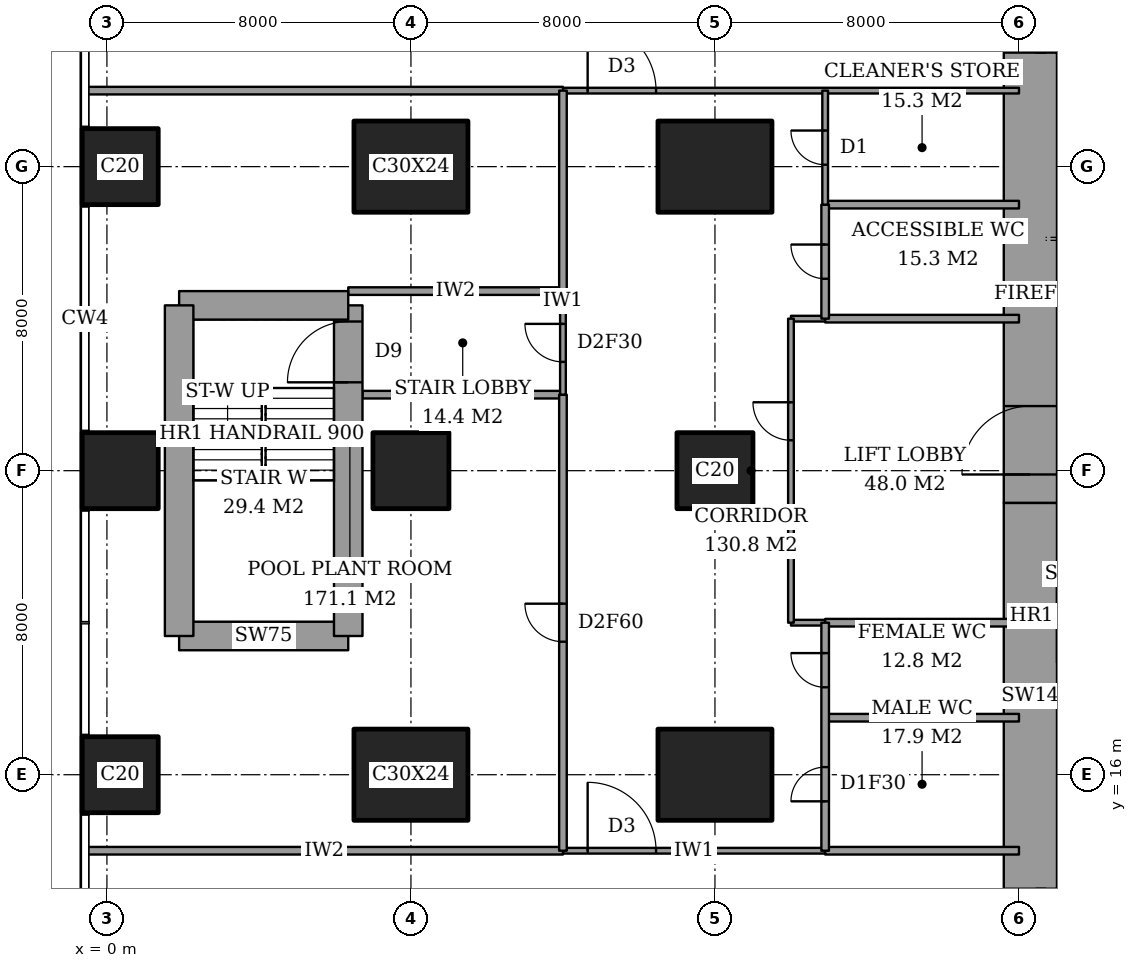
"""IFC4 building model, lengths in metres.
Left out: names, types, materials, properties, quantities, classifications, styles, units other than length and angle.
Written with IfcOpenShell. Run it as: python <this file> out.ifc"""

import sys

from ifc_helpers import new_model, si_unit, direction, frame, frame_2d, origin, origin_2d, place, context, subcontext, project, spatial, rectangle, extrude, element, fill, save


model = new_model("IFC4")
c1 = context("Model", 3, precision=1e-05, world=origin(), true_north=direction((0.0, 1.0)))
c2 = subcontext(c1, "Body", "Model", "MODEL_VIEW")
j1 = project(units=[si_unit("LENGTHUNIT", "METRE"), si_unit("PLANEANGLEUNIT", "RADIAN")], contexts=[c1])
p1 = place(None, origin())
s1 = spatial("IfcSite", under=j1, at=p1, CompositionType="ELEMENT")
p2 = place(p1, origin())
s2 = spatial("IfcBuilding", under=s1, at=p2, CompositionType="ELEMENT")
p3 = place(p2, frame((0.0, 0.0, 26.0)))
s3 = spatial("IfcBuildingStorey", under=s2, at=p3, CompositionType="ELEMENT", Elevation=26.0)
for number, where, z_axis, x_axis in (
    (1, (0.35, 16.0, 0.0), (0.0, 0.0, 1.0), (1.0, 0.0, 0.0)),
    (2, (0.35, 24.0, 0.0), (0.0, 0.0, 1.0), (1.0, 0.0, 0.0)),
    (3, (0.35, 32.0, 0.0), (0.0, 0.0, 1.0), (1.0, 0.0, 0.0)),
):
    element("IfcColumn", number, at=place(p3, frame(where, z_axis=z_axis, x_axis=x_axis)), inside=s3, PredefinedType="COLUMN", context=c2, shape_type="SweptSolid", body=[
        extrude(rectangle(XDim=2.0, YDim=2.0, at=origin_2d()), origin(), (0.0, 0.0, 1.0), 3.6),
    ])
p4 = place(p3, frame((8.0, 16.0, 0.0), z_axis=(0.0, 0.0, 1.0), x_axis=(1.0, 0.0, 0.0)))
e4 = element("IfcColumn", 4, at=p4, inside=s3, PredefinedType="COLUMN", context=c2, shape_type="SweptSolid", body=[
    extrude(rectangle(XDim=3.0, YDim=2.4, at=origin_2d()), origin(), (0.0, 0.0, 1.0), 3.6),
])
p5 = place(p3, frame((8.0, 24.0, 0.0), z_axis=(0.0, 0.0, 1.0), x_axis=(1.0, 0.0, 0.0)))
e5 = element("IfcColumn", 5, at=p5, inside=s3, PredefinedType="COLUMN", context=c2, shape_type="SweptSolid", body=[
    extrude(rectangle(XDim=2.0, YDim=2.0, at=origin_2d()), origin(), (0.0, 0.0, 1.0), 3.6),
])
for number, where, z_axis, x_axis in (
    (6, (8.0, 32.0, 0.0), (0.0, 0.0, 1.0), (1.0, 0.0, 0.0)),
    (7, (16.0, 16.0, 0.0), (0.0, 0.0, 1.0), (1.0, 0.0, 0.0)),
):
    element("IfcColumn", number, at=place(p3, frame(where, z_axis=z_axis, x_axis=x_axis)), inside=s3, PredefinedType="COLUMN", context=c2, shape_type="SweptSolid", body=[
        extrude(rectangle(XDim=3.0, YDim=2.4, at=origin_2d()), origin(), (0.0, 0.0, 1.0), 3.6),
    ])
p6 = place(p3, frame((16.0, 24.0, 0.0), z_axis=(0.0, 0.0, 1.0), x_axis=(1.0, 0.0, 0.0)))
e8 = element("IfcColumn", 8, at=p6, inside=s3, PredefinedType="COLUMN", context=c2, shape_type="SweptSolid", body=[
    extrude(rectangle(XDim=2.0, YDim=2.0, at=origin_2d()), origin(), (0.0, 0.0, 1.0), 3.6),
])
p7 = place(p3, frame((16.0, 32.0, 0.0), z_axis=(0.0, 0.0, 1.0), x_axis=(1.0, 0.0, 0.0)))
e9 = element("IfcColumn", 9, at=p7, inside=s3, PredefinedType="COLUMN", context=c2, shape_type="SweptSolid", body=[
    extrude(rectangle(XDim=3.0, YDim=2.4, at=origin_2d()), origin(), (0.0, 0.0, 1.0), 3.6),
])
p8 = place(p3, frame((24.3, 13.0, 0.0), z_axis=(0.0, 0.0, 1.0), x_axis=(0.0, 1.0, 0.0)))
e10 = element("IfcWall", 10, at=p8, inside=s3, PredefinedType="SHEAR", context=c2, shape_type="SweptSolid", body=[
    extrude(rectangle(XDim=10.15, YDim=1.4, at=frame_2d((5.075, 0.0))), origin(), (0.0, 0.0, 1.0), 3.6),
])
p9 = place(p3, frame((24.3, 23.15, 0.0), z_axis=(0.0, 0.0, 1.0), x_axis=(0.0, 1.0, 0.0)))
e11 = element("IfcWall", 11, at=p9, inside=s3, PredefinedType="SHEAR", context=c2, shape_type="SweptSolid", body=[
    extrude(rectangle(XDim=11.85, YDim=1.4, at=frame_2d((5.925, 0.0))), origin(), (0.0, 0.0, 1.0), 3.6),
])
p10 = place(p9, frame((0.75, 0.0, 0.0)))
e12 = element("IfcOpeningElement", 12, at=p10, cuts=e11, PredefinedType="OPENING", context=c2, shape_type="SweptSolid", body=[
    extrude(rectangle(XDim=1.8, YDim=2.4, at=frame_2d((0.9, 1.2))), frame((0.0, 0.71, 0.0), z_axis=(0.0, -1.0, 0.0), x_axis=(1.0, 0.0, 0.0)), (0.0, 0.0, 1.0), 1.42),
])
p11 = place(p3, frame((1.9, 19.65, 0.0), z_axis=(0.0, 0.0, 1.0), x_axis=(1.0, 0.0, 0.0)))
e13 = element("IfcWall", 13, at=p11, inside=s3, PredefinedType="SHEAR", context=c2, shape_type="SweptSolid", body=[
    extrude(rectangle(XDim=4.45, YDim=0.75, at=frame_2d((2.225, 0.0))), origin(), (0.0, 0.0, 1.0), 3.6),
])
p12 = place(p3, frame((6.35, 19.65, 0.0), z_axis=(0.0, 0.0, 1.0), x_axis=(0.0, 1.0, 0.0)))
e14 = element("IfcWall", 14, at=p12, inside=s3, PredefinedType="SHEAR", context=c2, shape_type="SweptSolid", body=[
    extrude(rectangle(XDim=8.7, YDim=0.75, at=frame_2d((4.35, 0.0))), origin(), (0.0, 0.0, 1.0), 3.6),
])
p13 = place(p12, frame((6.675, 0.0, 0.0)))
e15 = element("IfcOpeningElement", 15, at=p13, cuts=e14, PredefinedType="OPENING", context=c2, shape_type="SweptSolid", body=[
    extrude(rectangle(XDim=1.6, YDim=2.1, at=frame_2d((0.8, 1.05))), frame((0.0, 0.385, 0.0), z_axis=(0.0, -1.0, 0.0), x_axis=(1.0, 0.0, 0.0)), (0.0, 0.0, 1.0), 0.77),
])
p14 = place(p3, frame((6.35, 28.35, 0.0), z_axis=(0.0, 0.0, 1.0), x_axis=(-1.0, 0.0, 0.0)))
e16 = element("IfcWall", 16, at=p14, inside=s3, PredefinedType="SHEAR", context=c2, shape_type="SweptSolid", body=[
    extrude(rectangle(XDim=4.45, YDim=0.75, at=frame_2d((2.225, 0.0))), origin(), (0.0, 0.0, 1.0), 3.6),
])
p15 = place(p3, frame((1.9, 28.35, 0.0), z_axis=(0.0, 0.0, 1.0), x_axis=(0.0, -1.0, 0.0)))
e17 = element("IfcWall", 17, at=p15, inside=s3, PredefinedType="SHEAR", context=c2, shape_type="SweptSolid", body=[
    extrude(rectangle(XDim=8.7, YDim=0.75, at=frame_2d((4.35, 0.0))), origin(), (0.0, 0.0, 1.0), 3.6),
])
p16 = place(p3, frame((24.575, -0.575, 0.0), z_axis=(0.0, 0.0, 1.0), x_axis=(0.0, 1.0, 0.0)))
e18 = element("IfcWall", 18, at=p16, inside=s3, PredefinedType="SOLIDWALL", context=c2, shape_type="SweptSolid", body=[
    extrude(rectangle(XDim=13.575, YDim=0.25, at=frame_2d((6.788, 0.0))), origin(), (0.0, 0.0, 1.0), 3.6),
])
p17 = place(p16, frame((6.15, 0.0, 0.0)))
e19 = element("IfcOpeningElement", 19, at=p17, cuts=e18, PredefinedType="OPENING", context=c2, shape_type="SweptSolid", body=[
    extrude(rectangle(XDim=1.0, YDim=2.4, at=frame_2d((0.5, 1.2))), frame((0.0, 0.135, 0.0), z_axis=(0.0, -1.0, 0.0), x_axis=(1.0, 0.0, 0.0)), (0.0, 0.0, 1.0), 0.27),
])
p18 = place(p16, frame((2.688, 0.0, 0.6)))
e20 = element("IfcOpeningElement", 20, at=p18, cuts=e18, PredefinedType="OPENING", context=c2, shape_type="SweptSolid", body=[
    extrude(rectangle(XDim=2.4, YDim=2.0, at=frame_2d((1.2, 1.0))), frame((0.0, 0.135, 0.0), z_axis=(0.0, -1.0, 0.0), x_axis=(1.0, 0.0, 0.0)), (0.0, 0.0, 1.0), 0.27),
])
p19 = place(p16, frame((10.525, 0.0, 0.6)))
e21 = element("IfcOpeningElement", 21, at=p19, cuts=e18, PredefinedType="OPENING", context=c2, shape_type="SweptSolid", body=[
    extrude(rectangle(XDim=2.4, YDim=2.0, at=frame_2d((1.2, 1.0))), frame((0.0, 0.135, 0.0), z_axis=(0.0, -1.0, 0.0), x_axis=(1.0, 0.0, 0.0)), (0.0, 0.0, 1.0), 0.27),
])
p20 = place(p3, frame((-0.561, 14.0, 0.0), z_axis=(0.0, 0.0, 1.0), x_axis=(1.0, 0.0, 0.0)))
e22 = element("IfcWall", 22, at=p20, inside=s3, PredefinedType="PARTITIONING", context=c2, shape_type="SweptSolid", body=[
    extrude(rectangle(XDim=12.561, YDim=0.2, at=frame_2d((6.281, 0.0))), origin(), (0.0, 0.0, 1.0), 3.35),
])
p21 = place(p3, frame((18.9, 14.0, 0.0), z_axis=(0.0, 0.0, 1.0), x_axis=(1.0, 0.0, 0.0)))
e23 = element("IfcWall", 23, at=p21, inside=s3, PredefinedType="PARTITIONING", context=c2, shape_type="SweptSolid", body=[
    extrude(rectangle(XDim=5.1, YDim=0.2, at=frame_2d((2.55, 0.0))), origin(), (0.0, 0.0, 1.0), 3.35),
])
p22 = place(p3, frame((12.0, 14.0, 0.0), z_axis=(0.0, 0.0, 1.0), x_axis=(1.0, 0.0, 0.0)))
e24 = element("IfcWall", 24, at=p22, inside=s3, PredefinedType="PARTITIONING", context=c2, shape_type="SweptSolid", body=[
    extrude(rectangle(XDim=6.9, YDim=0.15, at=frame_2d((3.45, 0.0))), origin(), (0.0, 0.0, 1.0), 3.35),
])
p23 = place(p22, frame((0.65, 0.0, 0.0)))
e25 = element("IfcOpeningElement", 25, at=p23, cuts=e24, PredefinedType="OPENING", context=c2, shape_type="SweptSolid", body=[
    extrude(rectangle(XDim=1.8, YDim=2.1, at=frame_2d((0.9, 1.05))), frame((0.0, 0.085, 0.0), z_axis=(0.0, -1.0, 0.0), x_axis=(1.0, 0.0, 0.0)), (0.0, 0.0, 1.0), 0.17),
])
for number, where, z_axis, x_axis in (
    (26, (18.9, 17.5, 0.0), (0.0, 0.0, 1.0), (1.0, 0.0, 0.0)),
    (27, (18.9, 20.0, 0.0), (0.0, 0.0, 1.0), (1.0, 0.0, 0.0)),
):
    element("IfcWall", number, at=place(p3, frame(where, z_axis=z_axis, x_axis=x_axis)), inside=s3, PredefinedType="PARTITIONING", context=c2, shape_type="SweptSolid", body=[
        extrude(rectangle(XDim=5.1, YDim=0.2, at=frame_2d((2.55, 0.0))), origin(), (0.0, 0.0, 1.0), 3.35),
    ])
p24 = place(p3, frame((18.0, 20.0, 0.0), z_axis=(0.0, 0.0, 1.0), x_axis=(1.0, 0.0, 0.0)))
e28 = element("IfcWall", 28, at=p24, inside=s3, PredefinedType="PARTITIONING", context=c2, shape_type="SweptSolid", body=[
    extrude(rectangle(XDim=0.9, YDim=0.15, at=frame_2d((0.45, 0.0))), origin(), (0.0, 0.0, 1.0), 3.35),
])
p25 = place(p3, frame((6.725, 26.0, 0.0), z_axis=(0.0, 0.0, 1.0), x_axis=(1.0, 0.0, 0.0)))
e29 = element("IfcWall", 29, at=p25, inside=s3, PredefinedType="PARTITIONING", context=c2, shape_type="SweptSolid", body=[
    extrude(rectangle(XDim=5.275, YDim=0.2, at=frame_2d((2.637, 0.0))), origin(), (0.0, 0.0, 1.0), 3.35),
])
p26 = place(p3, frame((18.9, 28.0, 0.0), z_axis=(0.0, 0.0, 1.0), x_axis=(1.0, 0.0, 0.0)))
e30 = element("IfcWall", 30, at=p26, inside=s3, PredefinedType="PARTITIONING", context=c2, shape_type="SweptSolid", body=[
    extrude(rectangle(XDim=5.1, YDim=0.2, at=frame_2d((2.55, 0.0))), origin(), (0.0, 0.0, 1.0), 3.35),
])
p27 = place(p3, frame((18.0, 28.0, 0.0), z_axis=(0.0, 0.0, 1.0), x_axis=(1.0, 0.0, 0.0)))
e31 = element("IfcWall", 31, at=p27, inside=s3, PredefinedType="PARTITIONING", context=c2, shape_type="SweptSolid", body=[
    extrude(rectangle(XDim=0.9, YDim=0.15, at=frame_2d((0.45, 0.0))), origin(), (0.0, 0.0, 1.0), 3.35),
])
p28 = place(p3, frame((6.35, 28.725, 0.0), z_axis=(0.0, 0.0, 1.0), x_axis=(1.0, 0.0, 0.0)))
e32 = element("IfcWall", 32, at=p28, inside=s3, PredefinedType="PARTITIONING", context=c2, shape_type="SweptSolid", body=[
    extrude(rectangle(XDim=5.65, YDim=0.2, at=frame_2d((2.825, 0.0))), origin(), (0.0, 0.0, 1.0), 3.35),
])
p29 = place(p3, frame((18.9, 31.0, 0.0), z_axis=(0.0, 0.0, 1.0), x_axis=(1.0, 0.0, 0.0)))
e33 = element("IfcWall", 33, at=p29, inside=s3, PredefinedType="PARTITIONING", context=c2, shape_type="SweptSolid", body=[
    extrude(rectangle(XDim=5.1, YDim=0.2, at=frame_2d((2.55, 0.0))), origin(), (0.0, 0.0, 1.0), 3.35),
])
p30 = place(p3, frame((-0.561, 34.0, 0.0), z_axis=(0.0, 0.0, 1.0), x_axis=(1.0, 0.0, 0.0)))
e34 = element("IfcWall", 34, at=p30, inside=s3, PredefinedType="PARTITIONING", context=c2, shape_type="SweptSolid", body=[
    extrude(rectangle(XDim=12.561, YDim=0.2, at=frame_2d((6.281, 0.0))), origin(), (0.0, 0.0, 1.0), 3.35),
])
p31 = place(p3, frame((12.0, 34.0, 0.0), z_axis=(0.0, 0.0, 1.0), x_axis=(1.0, 0.0, 0.0)))
e35 = element("IfcWall", 35, at=p31, inside=s3, PredefinedType="PARTITIONING", context=c2, shape_type="SweptSolid", body=[
    extrude(rectangle(XDim=12.0, YDim=0.15, at=frame_2d((6.0, 0.0))), origin(), (0.0, 0.0, 1.0), 3.35),
])
p32 = place(p31, frame((0.65, 0.0, 0.0)))
e36 = element("IfcOpeningElement", 36, at=p32, cuts=e35, PredefinedType="OPENING", context=c2, shape_type="SweptSolid", body=[
    extrude(rectangle(XDim=1.8, YDim=2.1, at=frame_2d((0.9, 1.05))), frame((0.0, 0.085, 0.0), z_axis=(0.0, -1.0, 0.0), x_axis=(1.0, 0.0, 0.0)), (0.0, 0.0, 1.0), 0.17),
])
p33 = place(p3, frame((12.0, 14.0, 0.0), z_axis=(0.0, 0.0, 1.0), x_axis=(0.0, 1.0, 0.0)))
e37 = element("IfcWall", 37, at=p33, inside=s3, PredefinedType="PARTITIONING", context=c2, shape_type="SweptSolid", body=[
    extrude(rectangle(XDim=12.0, YDim=0.2, at=frame_2d((6.0, 0.0))), origin(), (0.0, 0.0, 1.0), 3.35),
])
p34 = place(p33, frame((5.5, 0.0, 0.0)))
e38 = element("IfcOpeningElement", 38, at=p34, cuts=e37, PredefinedType="OPENING", context=c2, shape_type="SweptSolid", body=[
    extrude(rectangle(XDim=1.0, YDim=2.1, at=frame_2d((0.5, 1.05))), frame((0.0, 0.11, 0.0), z_axis=(0.0, -1.0, 0.0), x_axis=(1.0, 0.0, 0.0)), (0.0, 0.0, 1.0), 0.22),
])
p35 = place(p3, frame((12.0, 28.725, 0.0), z_axis=(0.0, 0.0, 1.0), x_axis=(0.0, 1.0, 0.0)))
e39 = element("IfcWall", 39, at=p35, inside=s3, PredefinedType="PARTITIONING", context=c2, shape_type="SweptSolid", body=[
    extrude(rectangle(XDim=5.275, YDim=0.2, at=frame_2d((2.637, 0.0))), origin(), (0.0, 0.0, 1.0), 3.35),
])
p36 = place(p3, frame((12.0, 26.0, 0.0), z_axis=(0.0, 0.0, 1.0), x_axis=(0.0, 1.0, 0.0)))
e40 = element("IfcWall", 40, at=p36, inside=s3, PredefinedType="PARTITIONING", context=c2, shape_type="SweptSolid", body=[
    extrude(rectangle(XDim=2.725, YDim=0.15, at=frame_2d((1.363, 0.0))), origin(), (0.0, 0.0, 1.0), 3.35),
])
p37 = place(p36, frame((0.863, 0.0, 0.0)))
e41 = element("IfcOpeningElement", 41, at=p37, cuts=e40, PredefinedType="OPENING", context=c2, shape_type="SweptSolid", body=[
    extrude(rectangle(XDim=1.0, YDim=2.1, at=frame_2d((0.5, 1.05))), frame((0.0, 0.085, 0.0), z_axis=(0.0, -1.0, 0.0), x_axis=(1.0, 0.0, 0.0)), (0.0, 0.0, 1.0), 0.17),
])
p38 = place(p3, frame((18.0, 20.0, 0.0), z_axis=(0.0, 0.0, 1.0), x_axis=(0.0, 1.0, 0.0)))
e42 = element("IfcWall", 42, at=p38, inside=s3, PredefinedType="PARTITIONING", context=c2, shape_type="SweptSolid", body=[
    extrude(rectangle(XDim=8.0, YDim=0.15, at=frame_2d((4.0, 0.0))), origin(), (0.0, 0.0, 1.0), 3.35),
])
p39 = place(p38, frame((4.8, 0.0, 0.0)))
e43 = element("IfcOpeningElement", 43, at=p39, cuts=e42, PredefinedType="OPENING", context=c2, shape_type="SweptSolid", body=[
    extrude(rectangle(XDim=1.0, YDim=2.1, at=frame_2d((0.5, 1.05))), frame((0.0, 0.085, 0.0), z_axis=(0.0, -1.0, 0.0), x_axis=(1.0, 0.0, 0.0)), (0.0, 0.0, 1.0), 0.17),
])
p40 = place(p3, frame((18.9, 14.0, 0.0), z_axis=(0.0, 0.0, 1.0), x_axis=(0.0, 1.0, 0.0)))
e44 = element("IfcWall", 44, at=p40, inside=s3, PredefinedType="PARTITIONING", context=c2, shape_type="SweptSolid", body=[
    extrude(rectangle(XDim=6.0, YDim=0.2, at=frame_2d((3.0, 0.0))), origin(), (0.0, 0.0, 1.0), 3.35),
])
p41 = place(p40, frame((1.3, 0.0, 0.0)))
e45 = element("IfcOpeningElement", 45, at=p41, cuts=e44, PredefinedType="OPENING", context=c2, shape_type="SweptSolid", body=[
    extrude(rectangle(XDim=0.9, YDim=2.1, at=frame_2d((0.45, 1.05))), frame((0.0, 0.11, 0.0), z_axis=(0.0, -1.0, 0.0), x_axis=(1.0, 0.0, 0.0)), (0.0, 0.0, 1.0), 0.22),
])
p42 = place(p40, frame((4.3, 0.0, 0.0)))
e46 = element("IfcOpeningElement", 46, at=p42, cuts=e44, PredefinedType="OPENING", context=c2, shape_type="SweptSolid", body=[
    extrude(rectangle(XDim=0.9, YDim=2.1, at=frame_2d((0.45, 1.05))), frame((0.0, 0.11, 0.0), z_axis=(0.0, -1.0, 0.0), x_axis=(1.0, 0.0, 0.0)), (0.0, 0.0, 1.0), 0.22),
])
p43 = place(p3, frame((18.9, 28.0, 0.0), z_axis=(0.0, 0.0, 1.0), x_axis=(0.0, 1.0, 0.0)))
e47 = element("IfcWall", 47, at=p43, inside=s3, PredefinedType="PARTITIONING", context=c2, shape_type="SweptSolid", body=[
    extrude(rectangle(XDim=3.0, YDim=0.2, at=frame_2d((1.5, 0.0))), origin(), (0.0, 0.0, 1.0), 3.35),
])
p44 = place(p43, frame((1.05, 0.0, 0.0)))
e48 = element("IfcOpeningElement", 48, at=p44, cuts=e47, PredefinedType="OPENING", context=c2, shape_type="SweptSolid", body=[
    extrude(rectangle(XDim=0.9, YDim=2.1, at=frame_2d((0.45, 1.05))), frame((0.0, 0.11, 0.0), z_axis=(0.0, -1.0, 0.0), x_axis=(1.0, 0.0, 0.0)), (0.0, 0.0, 1.0), 0.22),
])
p45 = place(p3, frame((18.9, 31.0, 0.0), z_axis=(0.0, 0.0, 1.0), x_axis=(0.0, 1.0, 0.0)))
e49 = element("IfcWall", 49, at=p45, inside=s3, PredefinedType="PARTITIONING", context=c2, shape_type="SweptSolid", body=[
    extrude(rectangle(XDim=3.0, YDim=0.15, at=frame_2d((1.5, 0.0))), origin(), (0.0, 0.0, 1.0), 3.35),
])
p46 = place(p45, frame((1.05, 0.0, 0.0)))
e50 = element("IfcOpeningElement", 50, at=p46, cuts=e49, PredefinedType="OPENING", context=c2, shape_type="SweptSolid", body=[
    extrude(rectangle(XDim=0.9, YDim=2.1, at=frame_2d((0.45, 1.05))), frame((0.0, 0.085, 0.0), z_axis=(0.0, -1.0, 0.0), x_axis=(1.0, 0.0, 0.0)), (0.0, 0.0, 1.0), 0.17),
])
p47 = place(p23, origin())
e51 = element("IfcDoor", 51, at=p47, inside=s3, OperationType="DOUBLE_DOOR_DOUBLE_SWING", PredefinedType="DOOR", context=c2, shape_type="SweptSolid", body=[
    extrude(rectangle(XDim=1.8, YDim=2.1, at=frame_2d((0.9, 1.05))), frame((0.0, 0.025, 0.0), z_axis=(0.0, -1.0, 0.0), x_axis=(1.0, 0.0, 0.0)), (0.0, 0.0, 1.0), 0.05),
])
fill(e25, e51)
p48 = place(p34, origin())
e52 = element("IfcDoor", 52, at=p48, inside=s3, OperationType="SINGLE_SWING_LEFT", PredefinedType="DOOR", context=c2, shape_type="SweptSolid", body=[
    extrude(rectangle(XDim=1.0, YDim=2.1, at=frame_2d((0.5, 1.05))), frame((0.0, 0.025, 0.0), z_axis=(0.0, -1.0, 0.0), x_axis=(1.0, 0.0, 0.0)), (0.0, 0.0, 1.0), 0.05),
])
fill(e38, e52)
p49 = place(p32, origin())
e53 = element("IfcDoor", 53, at=p49, inside=s3, OperationType="DOUBLE_DOOR_DOUBLE_SWING", PredefinedType="DOOR", context=c2, shape_type="SweptSolid", body=[
    extrude(rectangle(XDim=1.8, YDim=2.1, at=frame_2d((0.9, 1.05))), frame((0.0, 0.025, 0.0), z_axis=(0.0, -1.0, 0.0), x_axis=(1.0, 0.0, 0.0)), (0.0, 0.0, 1.0), 0.05),
])
fill(e36, e53)
p50 = place(p39, origin())
e54 = element("IfcDoor", 54, at=p50, inside=s3, OperationType="SINGLE_SWING_LEFT", PredefinedType="DOOR", context=c2, shape_type="SweptSolid", body=[
    extrude(rectangle(XDim=1.0, YDim=2.1, at=frame_2d((0.5, 1.05))), frame((0.0, 0.025, 0.0), z_axis=(0.0, -1.0, 0.0), x_axis=(1.0, 0.0, 0.0)), (0.0, 0.0, 1.0), 0.05),
])
fill(e43, e54)
p51 = place(p41, origin())
e55 = element("IfcDoor", 55, at=p51, inside=s3, OperationType="SINGLE_SWING_RIGHT", PredefinedType="DOOR", context=c2, shape_type="SweptSolid", body=[
    extrude(rectangle(XDim=0.9, YDim=2.1, at=frame_2d((0.45, 1.05))), frame((0.0, 0.025, 0.0), z_axis=(0.0, -1.0, 0.0), x_axis=(1.0, 0.0, 0.0)), (0.0, 0.0, 1.0), 0.05),
])
fill(e45, e55)
p52 = place(p42, origin())
e56 = element("IfcDoor", 56, at=p52, inside=s3, OperationType="SINGLE_SWING_LEFT", PredefinedType="DOOR", context=c2, shape_type="SweptSolid", body=[
    extrude(rectangle(XDim=0.9, YDim=2.1, at=frame_2d((0.45, 1.05))), frame((0.0, 0.025, 0.0), z_axis=(0.0, -1.0, 0.0), x_axis=(1.0, 0.0, 0.0)), (0.0, 0.0, 1.0), 0.05),
])
fill(e46, e56)
p53 = place(p44, origin())
e57 = element("IfcDoor", 57, at=p53, inside=s3, OperationType="SINGLE_SWING_LEFT", PredefinedType="DOOR", context=c2, shape_type="SweptSolid", body=[
    extrude(rectangle(XDim=0.9, YDim=2.1, at=frame_2d((0.45, 1.05))), frame((0.0, 0.025, 0.0), z_axis=(0.0, -1.0, 0.0), x_axis=(1.0, 0.0, 0.0)), (0.0, 0.0, 1.0), 0.05),
])
fill(e48, e57)
p54 = place(p46, origin())
e58 = element("IfcDoor", 58, at=p54, inside=s3, OperationType="SINGLE_SWING_LEFT", PredefinedType="DOOR", context=c2, shape_type="SweptSolid", body=[
    extrude(rectangle(XDim=0.9, YDim=2.1, at=frame_2d((0.45, 1.05))), frame((0.0, 0.025, 0.0), z_axis=(0.0, -1.0, 0.0), x_axis=(1.0, 0.0, 0.0)), (0.0, 0.0, 1.0), 0.05),
])
fill(e50, e58)
p55 = place(p37, origin())
e59 = element("IfcDoor", 59, at=p55, inside=s3, OperationType="SINGLE_SWING_LEFT", PredefinedType="DOOR", context=c2, shape_type="SweptSolid", body=[
    extrude(rectangle(XDim=1.0, YDim=2.1, at=frame_2d((0.5, 1.05))), frame((0.0, 0.025, 0.0), z_axis=(0.0, -1.0, 0.0), x_axis=(1.0, 0.0, 0.0)), (0.0, 0.0, 1.0), 0.05),
])
fill(e41, e59)
p56 = place(p10, origin())
e60 = element("IfcDoor", 60, at=p56, inside=s3, OperationType="DOUBLE_DOOR_DOUBLE_SWING", PredefinedType="DOOR", context=c2, shape_type="SweptSolid", body=[
    extrude(rectangle(XDim=1.8, YDim=2.4, at=frame_2d((0.9, 1.2))), frame((0.0, 0.025, 0.0), z_axis=(0.0, -1.0, 0.0), x_axis=(1.0, 0.0, 0.0)), (0.0, 0.0, 1.0), 0.05),
])
fill(e12, e60)
p57 = place(p13, origin())
e61 = element("IfcDoor", 61, at=p57, inside=s3, OperationType="DOUBLE_DOOR_SINGLE_SWING", PredefinedType="DOOR", context=c2, shape_type="SweptSolid", body=[
    extrude(rectangle(XDim=1.6, YDim=2.1, at=frame_2d((0.8, 1.05))), frame((0.0, 0.025, 0.0), z_axis=(0.0, -1.0, 0.0), x_axis=(1.0, 0.0, 0.0)), (0.0, 0.0, 1.0), 0.05),
])
fill(e15, e61)
save(model, sys.argv[1])
